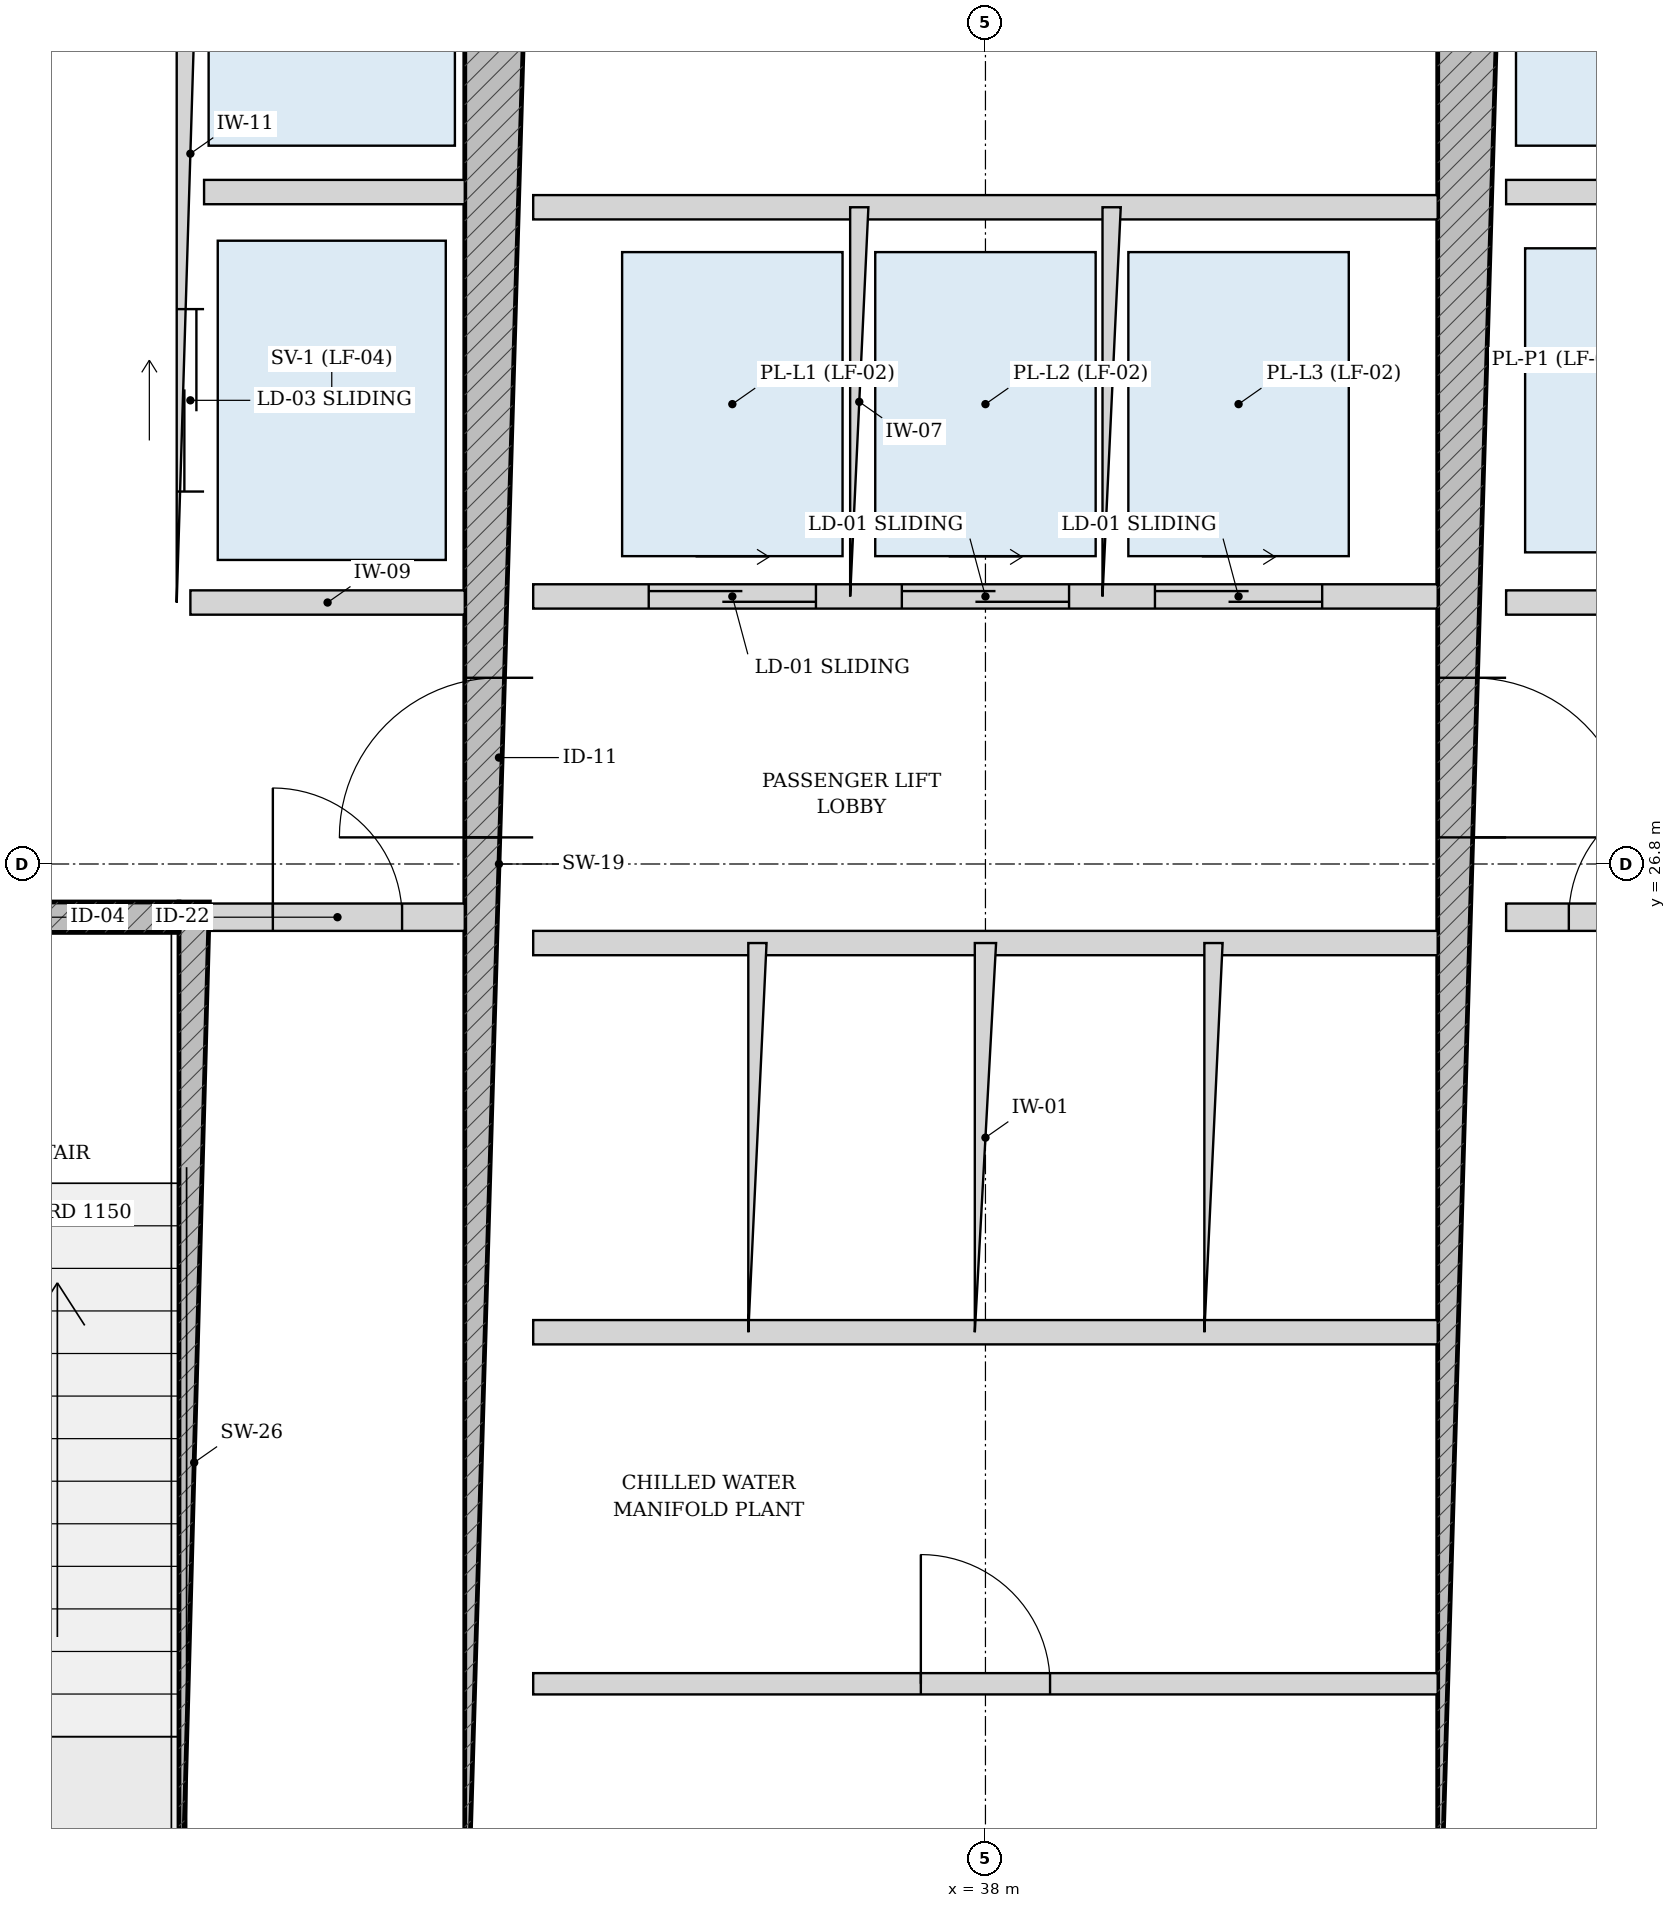
"""IFC4 building model, lengths in metres.
Left out: names, types, materials, properties, quantities, classifications, styles, units other than length and angle.
Written with IfcOpenShell. Run it as: python <this file> out.ifc"""

import sys

from ifc_helpers import new_model, si_unit, direction, frame, frame_2d, origin, place, context, subcontext, project, spatial, rectangle, extrude, source, transform, mapped, element, fill, save


model = new_model("IFC4")
c1 = context("Model", 3, precision=1e-05, world=origin(), true_north=direction((-0.2419218956, 0.970295726276)))
c2 = subcontext(c1, "Body", "Model", "MODEL_VIEW")
j1 = project(units=[si_unit("LENGTHUNIT", "METRE"), si_unit("PLANEANGLEUNIT", "RADIAN")], contexts=[c1])
p1 = place(None, origin())
s1 = spatial("IfcSite", under=j1, at=p1, CompositionType="ELEMENT")
p2 = place(p1, origin())
s2 = spatial("IfcBuilding", under=s1, at=p2, CompositionType="ELEMENT")
p3 = place(p2, frame((0.0, 0.0, 18.9)))
s3 = spatial("IfcBuildingStorey", under=s2, at=p3, CompositionType="ELEMENT", Elevation=18.9)
p4 = place(p3, frame((32.795, 19.175, 0.0), z_axis=(0.0, 0.0, 1.0), x_axis=(0.0, 1.0, 0.0)))
e1 = element("IfcWall", 1, at=p4, inside=s3, PredefinedType="SOLIDWALL", context=c2, shape_type="SweptSolid", body=[
    extrude(rectangle(XDim=7.375, YDim=0.2, at=frame_2d((3.688, 0.0))), origin(), (0.0, 0.0, 1.0), 4.82),
])
p5 = place(p3, frame((29.375, 26.45, 0.0), z_axis=(0.0, 0.0, 1.0), x_axis=(1.0, 0.0, 0.0)))
e2 = element("IfcWall", 2, at=p5, inside=s3, PredefinedType="SOLIDWALL", context=c2, shape_type="SweptSolid", body=[
    extrude(rectangle(XDim=3.32, YDim=0.2, at=frame_2d((1.66, 0.0))), origin(), (0.0, 0.0, 1.0), 4.82),
])
p6 = place(p5, frame((1.185, 0.0, 0.0)))
e3 = element("IfcOpeningElement", 3, at=p6, cuts=e2, PredefinedType="OPENING", context=c2, shape_type="SweptSolid", body=[
    extrude(rectangle(XDim=0.95, YDim=2.15, at=frame_2d((0.475, 1.075))), frame((0.0, 0.11, 0.0), z_axis=(0.0, -1.0, 0.0), x_axis=(1.0, 0.0, 0.0)), (0.0, 0.0, 1.0), 0.22),
])
p7 = place(p3, frame((34.8, 19.175, 0.0), z_axis=(0.0, 0.0, 1.0), x_axis=(0.0, 1.0, 0.0)))
e4 = element("IfcWall", 4, at=p7, inside=s3, PredefinedType="SHEAR", context=c2, shape_type="SweptSolid", body=[
    extrude(rectangle(XDim=15.25, YDim=0.45, at=frame_2d((7.625, 0.0))), origin(), (0.0, 0.0, 1.0), 4.82),
])
p8 = place(p7, frame((7.8, 0.0, 0.0)))
e5 = element("IfcOpeningElement", 5, at=p8, cuts=e4, PredefinedType="OPENING", context=c2, shape_type="SweptSolid", body=[
    extrude(rectangle(XDim=1.05, YDim=2.15, at=frame_2d((0.525, 1.075))), frame((0.0, 0.235, 0.0), z_axis=(0.0, -1.0, 0.0), x_axis=(1.0, 0.0, 0.0)), (0.0, 0.0, 1.0), 0.47),
])
p9 = place(p3, frame((41.2, 19.175, 0.0), z_axis=(0.0, 0.0, 1.0), x_axis=(0.0, 1.0, 0.0)))
e6 = element("IfcWall", 6, at=p9, inside=s3, PredefinedType="SHEAR", context=c2, shape_type="SweptSolid", body=[
    extrude(rectangle(XDim=15.25, YDim=0.45, at=frame_2d((7.625, 0.0))), origin(), (0.0, 0.0, 1.0), 4.82),
])
p10 = place(p9, frame((7.8, 0.0, 0.0)))
e7 = element("IfcOpeningElement", 7, at=p10, cuts=e6, PredefinedType="OPENING", context=c2, shape_type="SweptSolid", body=[
    extrude(rectangle(XDim=1.05, YDim=2.15, at=frame_2d((0.525, 1.075))), frame((0.0, 0.235, 0.0), z_axis=(0.0, -1.0, 0.0), x_axis=(1.0, 0.0, 0.0)), (0.0, 0.0, 1.0), 0.47),
])
p11 = place(p3, frame((32.9, 26.45, 0.0), z_axis=(0.0, 0.0, 1.0), x_axis=(1.0, 0.0, 0.0)))
e8 = element("IfcWall", 8, at=p11, inside=s3, PredefinedType="PARTITIONING", context=c2, shape_type="SweptSolid", body=[
    extrude(rectangle(XDim=1.675, YDim=0.18, at=frame_2d((0.837, 0.0))), origin(), (0.0, 0.0, 1.0), 4.82),
])
p12 = place(p11, frame((0.413, 0.0, 0.0)))
e9 = element("IfcOpeningElement", 9, at=p12, cuts=e8, PredefinedType="OPENING", context=c2, shape_type="SweptSolid", body=[
    extrude(rectangle(XDim=0.85, YDim=2.1, at=frame_2d((0.425, 1.05))), frame((0.0, 0.1, 0.0), z_axis=(0.0, -1.0, 0.0), x_axis=(1.0, 0.0, 0.0)), (0.0, 0.0, 1.0), 0.2),
])
p13 = place(p3, frame((41.425, 26.45, 0.0), z_axis=(0.0, 0.0, 1.0), x_axis=(1.0, 0.0, 0.0)))
e10 = element("IfcWall", 10, at=p13, inside=s3, PredefinedType="PARTITIONING", context=c2, shape_type="SweptSolid", body=[
    extrude(rectangle(XDim=1.675, YDim=0.18, at=frame_2d((0.837, 0.0))), origin(), (0.0, 0.0, 1.0), 4.82),
])
p14 = place(p13, frame((0.413, 0.0, 0.0)))
e11 = element("IfcOpeningElement", 11, at=p14, cuts=e10, PredefinedType="OPENING", context=c2, shape_type="SweptSolid", body=[
    extrude(rectangle(XDim=0.85, YDim=2.1, at=frame_2d((0.425, 1.05))), frame((0.0, 0.1, 0.0), z_axis=(0.0, -1.0, 0.0), x_axis=(1.0, 0.0, 0.0)), (0.0, 0.0, 1.0), 0.2),
])
p15 = place(p3, frame((32.77, 28.52, 0.0), z_axis=(0.0, 0.0, 1.0), x_axis=(0.0, 1.0, 0.0)))
e12 = element("IfcWall", 12, at=p15, inside=s3, PredefinedType="PARTITIONING", context=c2, shape_type="SweptSolid", body=[
    extrude(rectangle(XDim=5.905, YDim=0.18, at=frame_2d((2.953, 0.0))), origin(), (0.0, 0.0, 1.0), 4.82),
])
p16 = place(p15, frame((3.655, 0.0, 0.0)))
e13 = element("IfcOpeningElement", 13, at=p16, cuts=e12, PredefinedType="OPENING", context=c2, shape_type="SweptSolid", body=[
    extrude(rectangle(XDim=1.15, YDim=2.2, at=frame_2d((0.575, 1.1))), frame((0.0, 0.1, 0.0), z_axis=(0.0, -1.0, 0.0), x_axis=(1.0, 0.0, 0.0)), (0.0, 0.0, 1.0), 0.2),
])
p17 = place(p15, frame((0.73, 0.0, 0.0)))
e14 = element("IfcOpeningElement", 14, at=p17, cuts=e12, PredefinedType="OPENING", context=c2, shape_type="SweptSolid", body=[
    extrude(rectangle(XDim=1.2, YDim=2.25, at=frame_2d((0.6, 1.125))), frame((0.0, 0.1, 0.0), z_axis=(0.0, -1.0, 0.0), x_axis=(1.0, 0.0, 0.0)), (0.0, 0.0, 1.0), 0.2),
])
p18 = place(p3, frame((32.86, 31.22, 0.0), z_axis=(0.0, 0.0, 1.0), x_axis=(1.0, 0.0, 0.0)))
e15 = element("IfcWall", 15, at=p18, inside=s3, PredefinedType="PARTITIONING", context=c2, shape_type="SweptSolid", body=[
    extrude(rectangle(XDim=1.715, YDim=0.16, at=frame_2d((0.857, 0.0))), origin(), (0.0, 0.0, 1.0), 4.82),
])
p19 = place(p3, frame((32.77, 28.52, 0.0), z_axis=(0.0, 0.0, 1.0), x_axis=(1.0, 0.0, 0.0)))
e16 = element("IfcWall", 16, at=p19, inside=s3, PredefinedType="PARTITIONING", context=c2, shape_type="SweptSolid", body=[
    extrude(rectangle(XDim=1.805, YDim=0.16, at=frame_2d((0.902, 0.0))), origin(), (0.0, 0.0, 1.0), 4.82),
])
p20 = place(p3, frame((41.425, 31.22, 0.0), z_axis=(0.0, 0.0, 1.0), x_axis=(1.0, 0.0, 0.0)))
e17 = element("IfcWall", 17, at=p20, inside=s3, PredefinedType="PARTITIONING", context=c2, shape_type="SweptSolid", body=[
    extrude(rectangle(XDim=1.715, YDim=0.16, at=frame_2d((0.857, 0.0))), origin(), (0.0, 0.0, 1.0), 4.82),
])
p21 = place(p3, frame((41.425, 28.52, 0.0), z_axis=(0.0, 0.0, 1.0), x_axis=(1.0, 0.0, 0.0)))
e18 = element("IfcWall", 18, at=p21, inside=s3, PredefinedType="PARTITIONING", context=c2, shape_type="SweptSolid", body=[
    extrude(rectangle(XDim=1.805, YDim=0.16, at=frame_2d((0.902, 0.0))), origin(), (0.0, 0.0, 1.0), 4.82),
])
p22 = place(p3, frame((35.025, 28.56, 0.0), z_axis=(0.0, 0.0, 1.0), x_axis=(1.0, 0.0, 0.0)))
e19 = element("IfcWall", 19, at=p22, inside=s3, PredefinedType="PARTITIONING", context=c2, shape_type="SweptSolid", body=[
    extrude(rectangle(XDim=5.95, YDim=0.16, at=frame_2d((2.975, 0.0))), origin(), (0.0, 0.0, 1.0), 4.82),
])
p23 = place(p22, frame((0.76, 0.0, 0.0)))
e20 = element("IfcOpeningElement", 20, at=p23, cuts=e19, PredefinedType="OPENING", context=c2, shape_type="SweptSolid", body=[
    extrude(rectangle(XDim=1.1, YDim=2.2, at=frame_2d((0.55, 1.1))), frame((0.0, 0.09, 0.0), z_axis=(0.0, -1.0, 0.0), x_axis=(1.0, 0.0, 0.0)), (0.0, 0.0, 1.0), 0.18),
])
p24 = place(p22, frame((2.425, 0.0, 0.0)))
e21 = element("IfcOpeningElement", 21, at=p24, cuts=e19, PredefinedType="OPENING", context=c2, shape_type="SweptSolid", body=[
    extrude(rectangle(XDim=1.1, YDim=2.2, at=frame_2d((0.55, 1.1))), frame((0.0, 0.09, 0.0), z_axis=(0.0, -1.0, 0.0), x_axis=(1.0, 0.0, 0.0)), (0.0, 0.0, 1.0), 0.18),
])
p25 = place(p22, frame((4.09, 0.0, 0.0)))
e22 = element("IfcOpeningElement", 22, at=p25, cuts=e19, PredefinedType="OPENING", context=c2, shape_type="SweptSolid", body=[
    extrude(rectangle(XDim=1.1, YDim=2.2, at=frame_2d((0.55, 1.1))), frame((0.0, 0.09, 0.0), z_axis=(0.0, -1.0, 0.0), x_axis=(1.0, 0.0, 0.0)), (0.0, 0.0, 1.0), 0.18),
])
p26 = place(p3, frame((35.025, 31.12, 0.0), z_axis=(0.0, 0.0, 1.0), x_axis=(1.0, 0.0, 0.0)))
e23 = element("IfcWall", 23, at=p26, inside=s3, PredefinedType="PARTITIONING", context=c2, shape_type="SweptSolid", body=[
    extrude(rectangle(XDim=5.95, YDim=0.16, at=frame_2d((2.975, 0.0))), origin(), (0.0, 0.0, 1.0), 4.82),
])
for number, where, z_axis, x_axis in (
    (24, (37.17, 28.56, 0.0), (0.0, 0.0, 1.0), (0.0, 1.0, 0.0)),
    (25, (38.83, 28.56, 0.0), (0.0, 0.0, 1.0), (0.0, 1.0, 0.0)),
):
    element("IfcWall", number, at=place(p3, frame(where, z_axis=z_axis, x_axis=x_axis)), inside=s3, PredefinedType="PARTITIONING", context=c2, shape_type="SweptSolid", body=[
        extrude(rectangle(XDim=2.56, YDim=0.12, at=frame_2d((1.28, 0.0))), origin(), (0.0, 0.0, 1.0), 4.82),
    ])
for number, where, z_axis, x_axis in (
    (26, (35.025, 26.28, 0.0), (0.0, 0.0, 1.0), (1.0, 0.0, 0.0)),
    (27, (35.025, 23.72, 0.0), (0.0, 0.0, 1.0), (1.0, 0.0, 0.0)),
):
    element("IfcWall", number, at=place(p3, frame(where, z_axis=z_axis, x_axis=x_axis)), inside=s3, PredefinedType="PARTITIONING", context=c2, shape_type="SweptSolid", body=[
        extrude(rectangle(XDim=5.95, YDim=0.16, at=frame_2d((2.975, 0.0))), origin(), (0.0, 0.0, 1.0), 4.82),
    ])
p27 = place(p3, frame((36.5, 23.72, 0.0), z_axis=(0.0, 0.0, 1.0), x_axis=(0.0, 1.0, 0.0)))
e28 = element("IfcWall", 28, at=p27, inside=s3, PredefinedType="PARTITIONING", context=c2, shape_type="SweptSolid", body=[
    extrude(rectangle(XDim=2.56, YDim=0.12, at=frame_2d((1.28, 0.0))), origin(), (0.0, 0.0, 1.0), 4.82),
])
p28 = place(p3, frame((38.0, 23.72, 0.0), z_axis=(0.0, 0.0, 1.0), x_axis=(0.0, 1.0, 0.0)))
e29 = element("IfcWall", 29, at=p28, inside=s3, PredefinedType="PARTITIONING", context=c2, shape_type="SweptSolid", body=[
    extrude(rectangle(XDim=2.56, YDim=0.14, at=frame_2d((1.28, 0.0))), origin(), (0.0, 0.0, 1.0), 4.82),
])
p29 = place(p3, frame((39.5, 23.72, 0.0), z_axis=(0.0, 0.0, 1.0), x_axis=(0.0, 1.0, 0.0)))
e30 = element("IfcWall", 30, at=p29, inside=s3, PredefinedType="PARTITIONING", context=c2, shape_type="SweptSolid", body=[
    extrude(rectangle(XDim=2.56, YDim=0.12, at=frame_2d((1.28, 0.0))), origin(), (0.0, 0.0, 1.0), 4.82),
])
p30 = place(p3, frame((35.025, 21.407, 0.0), z_axis=(0.0, 0.0, 1.0), x_axis=(1.0, 0.0, 0.0)))
e31 = element("IfcWall", 31, at=p30, inside=s3, PredefinedType="PARTITIONING", context=c2, shape_type="SweptSolid", body=[
    extrude(rectangle(XDim=5.95, YDim=0.14, at=frame_2d((2.975, 0.0))), origin(), (0.0, 0.0, 1.0), 4.82),
])
p31 = place(p30, frame((2.55, 0.0, 0.0)))
e32 = element("IfcOpeningElement", 32, at=p31, cuts=e31, PredefinedType="OPENING", context=c2, shape_type="SweptSolid", body=[
    extrude(rectangle(XDim=0.85, YDim=2.1, at=frame_2d((0.425, 1.05))), frame((0.0, 0.08, 0.0), z_axis=(0.0, -1.0, 0.0), x_axis=(1.0, 0.0, 0.0)), (0.0, 0.0, 1.0), 0.16),
])
m1 = source(origin(), c2, "Body", "SweptSolid", [
    extrude(rectangle(XDim=1.05, YDim=2.15, at=frame_2d((0.525, 1.075))), frame((0.0, 0.025, 0.0), z_axis=(0.0, -1.0, 0.0), x_axis=(1.0, 0.0, 0.0)), (0.0, 0.0, 1.0), 0.05),
])
p32 = place(p8, origin())
e33 = element("IfcDoor", 33, at=p32, inside=s3, OperationType="SINGLE_SWING_LEFT", PredefinedType="DOOR", context=c2, shape_type="MappedRepresentation", body=[
    mapped(m1, transform((0.0, 0.0, 0.0), scale=1.0)),
])
fill(e5, e33)
p33 = place(p10, frame((1.05, 0.0, 0.0), z_axis=(0.0, 0.0, 1.0), x_axis=(-1.0, 0.0, 0.0)))
e34 = element("IfcDoor", 34, at=p33, inside=s3, OperationType="SINGLE_SWING_RIGHT", PredefinedType="DOOR", context=c2, shape_type="MappedRepresentation", body=[
    mapped(m1, transform((0.0, 0.0, 0.0), scale=1.0)),
])
fill(e7, e34)
m2 = source(origin(), c2, "Body", "SweptSolid", [
    extrude(rectangle(XDim=0.85, YDim=2.1, at=frame_2d((0.425, 1.05))), frame((0.0, 0.025, 0.0), z_axis=(0.0, -1.0, 0.0), x_axis=(1.0, 0.0, 0.0)), (0.0, 0.0, 1.0), 0.05),
])
p34 = place(p12, origin())
e35 = element("IfcDoor", 35, at=p34, inside=s3, OperationType="SINGLE_SWING_LEFT", PredefinedType="DOOR", context=c2, shape_type="MappedRepresentation", body=[
    mapped(m2, transform((0.0, 0.0, 0.0), scale=1.0)),
])
fill(e9, e35)
p35 = place(p14, origin())
e36 = element("IfcDoor", 36, at=p35, inside=s3, OperationType="SINGLE_SWING_RIGHT", PredefinedType="DOOR", context=c2, shape_type="MappedRepresentation", body=[
    mapped(m2, transform((0.0, 0.0, 0.0), scale=1.0)),
])
fill(e11, e36)
p36 = place(p31, origin())
e37 = element("IfcDoor", 37, at=p36, inside=s3, OperationType="SINGLE_SWING_LEFT", PredefinedType="DOOR", context=c2, shape_type="MappedRepresentation", body=[
    mapped(m2, transform((0.0, 0.0, 0.0), scale=1.0)),
])
fill(e32, e37)
m3 = source(origin(), c2, "Body", "SweptSolid", [
    extrude(rectangle(XDim=1.2, YDim=2.25, at=frame_2d((0.6, 1.125))), frame((0.0, 0.025, 0.0), z_axis=(0.0, -1.0, 0.0), x_axis=(1.0, 0.0, 0.0)), (0.0, 0.0, 1.0), 0.05),
])
p37 = place(p17, origin())
e38 = element("IfcDoor", 38, at=p37, inside=s3, OperationType="DOUBLE_DOOR_SLIDING", PredefinedType="DOOR", context=c2, shape_type="MappedRepresentation", body=[
    mapped(m3, transform((0.0, 0.0, 0.0), scale=1.0)),
])
fill(e14, e38)
m4 = source(origin(), c2, "Body", "SweptSolid", [
    extrude(rectangle(XDim=1.1, YDim=2.2, at=frame_2d((0.55, 1.1))), frame((0.0, 0.025, 0.0), z_axis=(0.0, -1.0, 0.0), x_axis=(1.0, 0.0, 0.0)), (0.0, 0.0, 1.0), 0.05),
])
p38 = place(p23, origin())
e39 = element("IfcDoor", 39, at=p38, inside=s3, OperationType="DOUBLE_DOOR_SLIDING", PredefinedType="DOOR", context=c2, shape_type="MappedRepresentation", body=[
    mapped(m4, transform((0.0, 0.0, 0.0), scale=1.0)),
])
fill(e20, e39)
p39 = place(p24, origin())
e40 = element("IfcDoor", 40, at=p39, inside=s3, OperationType="DOUBLE_DOOR_SLIDING", PredefinedType="DOOR", context=c2, shape_type="MappedRepresentation", body=[
    mapped(m4, transform((0.0, 0.0, 0.0), scale=1.0)),
])
fill(e21, e40)
p40 = place(p25, origin())
e41 = element("IfcDoor", 41, at=p40, inside=s3, OperationType="DOUBLE_DOOR_SLIDING", PredefinedType="DOOR", context=c2, shape_type="MappedRepresentation", body=[
    mapped(m4, transform((0.0, 0.0, 0.0), scale=1.0)),
])
fill(e22, e41)
save(model, sys.argv[1])
